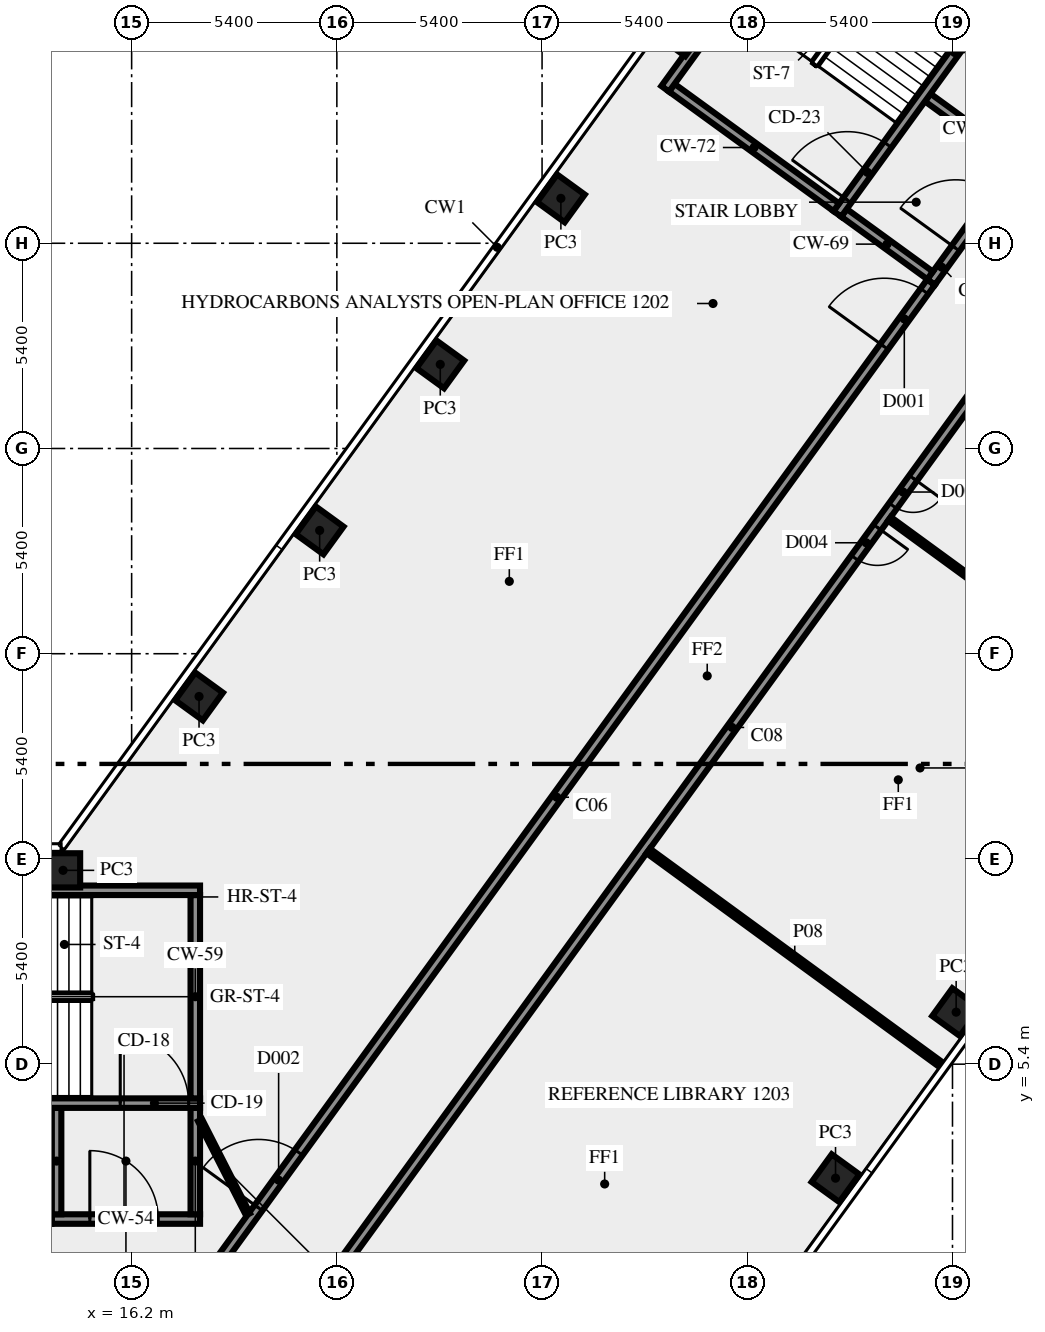
"""IFC4 building model, lengths in metres.
Left out: names, types, materials, properties, quantities, classifications, styles, units other than length and angle.
Written with IfcOpenShell. Run it as: python <this file> out.ifc"""

import sys

from ifc_helpers import new_model, si_unit, direction, frame, frame_2d, origin, origin_2d, place, context, subcontext, project, spatial, rectangle, extrude, element, fill, save


model = new_model("IFC4")
c1 = context("Model", 3, precision=1e-05, world=origin(), true_north=direction((0.0, 1.0)))
c2 = subcontext(c1, "Body", "Model", "MODEL_VIEW")
j1 = project(units=[si_unit("LENGTHUNIT", "METRE"), si_unit("PLANEANGLEUNIT", "RADIAN")], contexts=[c1])
p1 = place(None, origin())
s1 = spatial("IfcSite", under=j1, at=p1, CompositionType="ELEMENT")
p2 = place(p1, origin())
s2 = spatial("IfcBuilding", under=s1, at=p2, CompositionType="ELEMENT")
p3 = place(p2, frame((0.0, 0.0, 55.0)))
s3 = spatial("IfcBuildingStorey", under=s2, at=p3, CompositionType="ELEMENT", Elevation=55.0)
for number, where, z_axis, x_axis in (
    (1, (34.722, 2.4, 0.0), (0.0, 0.0, 1.0), (0.588, 0.809, 0.0)),
    (2, (37.896, 6.769, 0.0), (0.0, 0.0, 1.0), (0.588, 0.809, 0.0)),
    (3, (30.669, 32.55, 0.0), (0.0, 0.0, 1.0), (-0.588, -0.809, 0.0)),
    (4, (27.495, 28.181, 0.0), (0.0, 0.0, 1.0), (-0.588, -0.809, 0.0)),
    (5, (24.321, 23.812, 0.0), (0.0, 0.0, 1.0), (-0.588, -0.809, 0.0)),
    (6, (21.147, 19.444, 0.0), (0.0, 0.0, 1.0), (-0.588, -0.809, 0.0)),
    (7, (17.974, 15.075, 0.0), (0.0, 0.0, 1.0), (-0.588, -0.809, 0.0)),
    (8, (14.395, 10.5, 0.0), (0.0, 0.0, 1.0), (-1.0, 0.0, 0.0)),
):
    element("IfcColumn", number, at=place(p3, frame(where, z_axis=z_axis, x_axis=x_axis)), inside=s3, PredefinedType="COLUMN", context=c2, shape_type="SweptSolid", body=[
        extrude(rectangle(XDim=0.9, YDim=0.9, at=origin_2d()), origin(), (0.0, 0.0, 1.0), 3.65),
    ])
p4 = place(p3, frame((14.1, 1.325, 0.0), z_axis=(0.0, 0.0, 1.0), x_axis=(1.0, 0.0, 0.0)))
e9 = element("IfcWall", 9, at=p4, inside=s3, PredefinedType="SHEAR", context=c2, shape_type="SweptSolid", body=[
    extrude(rectangle(XDim=3.9, YDim=0.25, at=frame_2d((1.95, 0.0))), origin(), (0.0, 0.0, 1.0), 3.65),
])
p5 = place(p4, frame((1.0, 0.0, 0.0)))
e10 = element("IfcOpeningElement", 10, at=p5, cuts=e9, PredefinedType="OPENING", context=c2, shape_type="SweptSolid", body=[
    extrude(rectangle(XDim=1.8, YDim=2.1, at=frame_2d((0.9, 1.05))), frame((0.0, 0.135, 0.0), z_axis=(0.0, -1.0, 0.0), x_axis=(1.0, 0.0, 0.0)), (0.0, 0.0, 1.0), 0.27),
])
for number, where, z_axis, x_axis in (
    (11, (14.225, 1.45, 0.0), (0.0, 0.0, 1.0), (0.0, 1.0, 0.0)),
    (12, (17.875, 1.45, 0.0), (0.0, 0.0, 1.0), (0.0, 1.0, 0.0)),
):
    element("IfcWall", number, at=place(p3, frame(where, z_axis=z_axis, x_axis=x_axis)), inside=s3, PredefinedType="SHEAR", context=c2, shape_type="SweptSolid", body=[
        extrude(rectangle(XDim=2.8, YDim=0.25, at=frame_2d((1.4, 0.0))), origin(), (0.0, 0.0, 1.0), 3.65),
    ])
p6 = place(p3, frame((7.5, 4.375, 0.0), z_axis=(0.0, 0.0, 1.0), x_axis=(1.0, 0.0, 0.0)))
e13 = element("IfcWall", 13, at=p6, inside=s3, PredefinedType="SHEAR", context=c2, shape_type="SweptSolid", body=[
    extrude(rectangle(XDim=10.5, YDim=0.25, at=frame_2d((5.25, 0.0))), origin(), (0.0, 0.0, 1.0), 3.65),
])
p7 = place(p6, frame((8.4, 0.0, 0.0)))
e14 = element("IfcOpeningElement", 14, at=p7, cuts=e13, PredefinedType="OPENING", context=c2, shape_type="SweptSolid", body=[
    extrude(rectangle(XDim=1.8, YDim=2.1, at=frame_2d((0.9, 1.05))), frame((0.0, 0.135, 0.0), z_axis=(0.0, -1.0, 0.0), x_axis=(1.0, 0.0, 0.0)), (0.0, 0.0, 1.0), 0.27),
])
p8 = place(p3, frame((17.875, 4.5, 0.0), z_axis=(0.0, 0.0, 1.0), x_axis=(0.0, 1.0, 0.0)))
e15 = element("IfcWall", 15, at=p8, inside=s3, PredefinedType="SHEAR", context=c2, shape_type="SweptSolid", body=[
    extrude(rectangle(XDim=5.35, YDim=0.25, at=frame_2d((2.675, 0.0))), origin(), (0.0, 0.0, 1.0), 3.65),
])
p9 = place(p3, frame((7.5, 9.975, 0.0), z_axis=(0.0, 0.0, 1.0), x_axis=(1.0, 0.0, 0.0)))
e16 = element("IfcWall", 16, at=p9, inside=s3, PredefinedType="SHEAR", context=c2, shape_type="SweptSolid", body=[
    extrude(rectangle(XDim=10.5, YDim=0.25, at=frame_2d((5.25, 0.0))), origin(), (0.0, 0.0, 1.0), 3.65),
])
p10 = place(p9, frame((2.0, 0.0, 1.0)))
e17 = element("IfcOpeningElement", 17, at=p10, cuts=e16, PredefinedType="OPENING", context=c2, shape_type="SweptSolid", body=[
    extrude(rectangle(XDim=1.2, YDim=1.2, at=frame_2d((0.6, 0.6))), frame((0.0, 0.135, 0.0), z_axis=(0.0, -1.0, 0.0), x_axis=(1.0, 0.0, 0.0)), (0.0, 0.0, 1.0), 0.27),
])
p11 = place(p3, frame((37.238, 25.98, 0.0), z_axis=(0.0, 0.0, 1.0), x_axis=(0.587772420479, 0.809026317077, 0.0)))
e18 = element("IfcWall", 18, at=p11, inside=s3, PredefinedType="SHEAR", context=c2, shape_type="SweptSolid", body=[
    extrude(rectangle(XDim=4.0, YDim=0.25, at=frame_2d((2.0, 0.0))), origin(), (0.0, 0.0, 1.0), 3.65),
])
p12 = place(p11, frame((1.1, 0.0, 0.0)))
e19 = element("IfcOpeningElement", 19, at=p12, cuts=e18, PredefinedType="OPENING", context=c2, shape_type="SweptSolid", body=[
    extrude(rectangle(XDim=1.8, YDim=2.1, at=frame_2d((0.9, 1.05))), frame((0.0, 0.135, 0.0), z_axis=(0.0, -1.0, 0.0), x_axis=(1.0, 0.0, 0.0)), (0.0, 0.0, 1.0), 0.27),
])
for number, where, z_axis, x_axis in (
    (20, (37.21, 26.154, 0.0), (0.0, 0.0, 1.0), (-0.809, 0.588, 0.0)),
    (21, (39.414, 29.188, 0.0), (0.0, 0.0, 1.0), (-0.809, 0.588, 0.0)),
):
    element("IfcWall", number, at=place(p3, frame(where, z_axis=z_axis, x_axis=x_axis)), inside=s3, PredefinedType="SHEAR", context=c2, shape_type="SweptSolid", body=[
        extrude(rectangle(XDim=2.8, YDim=0.25, at=frame_2d((1.4, 0.0))), origin(), (0.0, 0.0, 1.0), 3.65),
    ])
p13 = place(p3, frame((34.77, 27.772, 0.0), z_axis=(0.0, 0.0, 1.0), x_axis=(0.587795589702, 0.809009483706, 0.0)))
e22 = element("IfcWall", 22, at=p13, inside=s3, PredefinedType="SHEAR", context=c2, shape_type="SweptSolid", body=[
    extrude(rectangle(XDim=10.5, YDim=0.25, at=frame_2d((5.25, 0.0))), origin(), (0.0, 0.0, 1.0), 3.65),
])
p14 = place(p13, frame((0.45, 0.0, 0.0)))
e23 = element("IfcOpeningElement", 23, at=p14, cuts=e22, PredefinedType="OPENING", context=c2, shape_type="SweptSolid", body=[
    extrude(rectangle(XDim=1.8, YDim=2.1, at=frame_2d((0.9, 1.05))), frame((0.0, 0.135, 0.0), z_axis=(0.0, -1.0, 0.0), x_axis=(1.0, 0.0, 0.0)), (0.0, 0.0, 1.0), 0.27),
])
p15 = place(p3, frame((34.742, 27.947, 0.0), z_axis=(0.0, 0.0, 1.0), x_axis=(-0.8089984606, 0.587810760999, 0.0)))
e24 = element("IfcWall", 24, at=p15, inside=s3, PredefinedType="SHEAR", context=c2, shape_type="SweptSolid", body=[
    extrude(rectangle(XDim=5.35, YDim=0.25, at=frame_2d((2.675, 0.0))), origin(), (0.0, 0.0, 1.0), 3.65),
])
p16 = place(p3, frame((30.24, 31.064, 0.0), z_axis=(0.0, 0.0, 1.0), x_axis=(0.587795589702, 0.809009483706, 0.0)))
e25 = element("IfcWall", 25, at=p16, inside=s3, PredefinedType="SHEAR", context=c2, shape_type="SweptSolid", body=[
    extrude(rectangle(XDim=10.5, YDim=0.25, at=frame_2d((5.25, 0.0))), origin(), (0.0, 0.0, 1.0), 3.65),
])
p17 = place(p16, frame((2.15, 0.0, 1.0)))
e26 = element("IfcOpeningElement", 26, at=p17, cuts=e25, PredefinedType="OPENING", context=c2, shape_type="SweptSolid", body=[
    extrude(rectangle(XDim=1.2, YDim=1.2, at=frame_2d((0.6, 0.6))), frame((0.0, 0.135, 0.0), z_axis=(0.0, -1.0, 0.0), x_axis=(1.0, 0.0, 0.0)), (0.0, 0.0, 1.0), 0.27),
])
p18 = place(p3, frame((17.545, -1.125, 0.0), z_axis=(0.0, 0.0, 1.0), x_axis=(0.587786323093, 0.809016216391, 0.0)))
e27 = element("IfcWall", 27, at=p18, inside=s3, PredefinedType="SOLIDWALL", context=c2, shape_type="SweptSolid", body=[
    extrude(rectangle(XDim=33.493, YDim=0.25, at=frame_2d((16.747, 0.0))), origin(), (0.0, 0.0, 1.0), 3.65),
])
p19 = place(p18, frame((31.403, 0.0, 0.0)))
e28 = element("IfcOpeningElement", 28, at=p19, cuts=e27, PredefinedType="OPENING", context=c2, shape_type="SweptSolid", body=[
    extrude(rectangle(XDim=1.8, YDim=2.1, at=frame_2d((0.9, 1.05))), frame((0.0, 0.135, 0.0), z_axis=(0.0, -1.0, 0.0), x_axis=(1.0, 0.0, 0.0)), (0.0, 0.0, 1.0), 0.27),
])
p20 = place(p18, frame((3.392, 0.0, 0.0)))
e29 = element("IfcOpeningElement", 29, at=p20, cuts=e27, PredefinedType="OPENING", context=c2, shape_type="SweptSolid", body=[
    extrude(rectangle(XDim=1.8, YDim=2.1, at=frame_2d((0.9, 1.05))), frame((0.0, 0.135, 0.0), z_axis=(0.0, -1.0, 0.0), x_axis=(1.0, 0.0, 0.0)), (0.0, 0.0, 1.0), 0.27),
])
p21 = place(p3, frame((43.467, 30.045, 0.0), z_axis=(0.0, 0.0, 1.0), x_axis=(-0.587784726077, -0.809017376692, 0.0)))
e30 = element("IfcWall", 30, at=p21, inside=s3, PredefinedType="SOLIDWALL", context=c2, shape_type="SweptSolid", body=[
    extrude(rectangle(XDim=39.02, YDim=0.25, at=frame_2d((19.51, 0.0))), origin(), (0.0, 0.0, 1.0), 3.65),
])
p22 = place(p21, frame((11.404, 0.0, 0.0)))
e31 = element("IfcOpeningElement", 31, at=p22, cuts=e30, PredefinedType="OPENING", context=c2, shape_type="SweptSolid", body=[
    extrude(rectangle(XDim=0.9, YDim=2.1, at=frame_2d((0.45, 1.05))), frame((0.0, 0.135, 0.0), z_axis=(0.0, -1.0, 0.0), x_axis=(1.0, 0.0, 0.0)), (0.0, 0.0, 1.0), 0.27),
])
p23 = place(p21, frame((13.004, 0.0, 0.0)))
e32 = element("IfcOpeningElement", 32, at=p23, cuts=e30, PredefinedType="OPENING", context=c2, shape_type="SweptSolid", body=[
    extrude(rectangle(XDim=1.0, YDim=2.1, at=frame_2d((0.5, 1.05))), frame((0.0, 0.135, 0.0), z_axis=(0.0, -1.0, 0.0), x_axis=(1.0, 0.0, 0.0)), (0.0, 0.0, 1.0), 0.27),
])
p24 = place(p21, frame((37.287, 0.0, 0.0)))
e33 = element("IfcOpeningElement", 33, at=p24, cuts=e30, PredefinedType="OPENING", context=c2, shape_type="SweptSolid", body=[
    extrude(rectangle(XDim=1.2, YDim=2.1, at=frame_2d((0.6, 1.05))), frame((0.0, 0.135, 0.0), z_axis=(0.0, -1.0, 0.0), x_axis=(1.0, 0.0, 0.0)), (0.0, 0.0, 1.0), 0.27),
])
p25 = place(p21, frame((0.224, 0.0, 0.0)))
e34 = element("IfcOpeningElement", 34, at=p25, cuts=e30, PredefinedType="OPENING", context=c2, shape_type="SweptSolid", body=[
    extrude(rectangle(XDim=0.9, YDim=2.1, at=frame_2d((0.45, 1.05))), frame((0.0, 0.135, 0.0), z_axis=(0.0, -1.0, 0.0), x_axis=(1.0, 0.0, 0.0)), (0.0, 0.0, 1.0), 0.27),
])
p26 = place(p3, frame((36.141, 19.749, 0.0), z_axis=(0.0, 0.0, 1.0), x_axis=(0.807691251741, -0.589605666408, 0.0)))
e35 = element("IfcWall", 35, at=p26, inside=s3, PredefinedType="PARTITIONING", context=c2, shape_type="SweptSolid", body=[
    extrude(rectangle(XDim=9.55, YDim=0.12, at=frame_2d((4.775, 0.0))), origin(), (0.0, 0.0, 1.0), 2.75),
])
p27 = place(p3, frame((29.793, 11.012, 0.0), z_axis=(0.0, 0.0, 1.0), x_axis=(0.807645841498, -0.589667868135, 0.0)))
e36 = element("IfcWall", 36, at=p27, inside=s3, PredefinedType="PARTITIONING", context=c2, shape_type="SweptSolid", body=[
    extrude(rectangle(XDim=9.551, YDim=0.15, at=frame_2d((4.775, 0.0))), origin(), (0.0, 0.0, 1.0), 2.75),
])
p28 = place(p3, frame((18.0, 3.925, 0.0), z_axis=(0.0, 0.0, 1.0), x_axis=(0.453950796792, -0.891026752736, 0.0)))
e37 = element("IfcWall", 37, at=p28, inside=s3, PredefinedType="PARTITIONING", context=c2, shape_type="SweptSolid", body=[
    extrude(rectangle(XDim=2.778, YDim=0.12, at=frame_2d((1.389, 0.0))), origin(), (0.0, 0.0, 1.0), 3.65),
])
p29 = place(p5, origin())
e38 = element("IfcDoor", 38, at=p29, inside=s3, OperationType="DOUBLE_DOOR_SINGLE_SWING", PredefinedType="DOOR", context=c2, shape_type="SweptSolid", body=[
    extrude(rectangle(XDim=1.8, YDim=2.1, at=frame_2d((0.9, 1.05))), frame((0.0, 0.025, 0.0), z_axis=(0.0, -1.0, 0.0), x_axis=(1.0, 0.0, 0.0)), (0.0, 0.0, 1.0), 0.05),
])
fill(e10, e38)
p30 = place(p7, origin())
e39 = element("IfcDoor", 39, at=p30, inside=s3, OperationType="DOUBLE_DOOR_SINGLE_SWING", PredefinedType="DOOR", context=c2, shape_type="SweptSolid", body=[
    extrude(rectangle(XDim=1.8, YDim=2.1, at=frame_2d((0.9, 1.05))), frame((0.0, 0.025, 0.0), z_axis=(0.0, -1.0, 0.0), x_axis=(1.0, 0.0, 0.0)), (0.0, 0.0, 1.0), 0.05),
])
fill(e14, e39)
p31 = place(p12, origin())
e40 = element("IfcDoor", 40, at=p31, inside=s3, OperationType="DOUBLE_DOOR_SINGLE_SWING", PredefinedType="DOOR", context=c2, shape_type="SweptSolid", body=[
    extrude(rectangle(XDim=1.8, YDim=2.1, at=frame_2d((0.9, 1.05))), frame((0.0, 0.025, 0.0), z_axis=(0.0, -1.0, 0.0), x_axis=(1.0, 0.0, 0.0)), (0.0, 0.0, 1.0), 0.05),
])
fill(e19, e40)
p32 = place(p14, origin())
e41 = element("IfcDoor", 41, at=p32, inside=s3, OperationType="DOUBLE_DOOR_SINGLE_SWING", PredefinedType="DOOR", context=c2, shape_type="SweptSolid", body=[
    extrude(rectangle(XDim=1.8, YDim=2.1, at=frame_2d((0.9, 1.05))), frame((0.0, 0.025, 0.0), z_axis=(0.0, -1.0, 0.0), x_axis=(1.0, 0.0, 0.0)), (0.0, 0.0, 1.0), 0.05),
])
fill(e23, e41)
p33 = place(p19, origin())
e42 = element("IfcDoor", 42, at=p33, inside=s3, OperationType="DOUBLE_DOOR_SINGLE_SWING", PredefinedType="DOOR", context=c2, shape_type="SweptSolid", body=[
    extrude(rectangle(XDim=1.8, YDim=2.1, at=frame_2d((0.9, 1.05))), frame((0.0, 0.025, 0.0), z_axis=(0.0, -1.0, 0.0), x_axis=(1.0, 0.0, 0.0)), (0.0, 0.0, 1.0), 0.05),
])
fill(e28, e42)
p34 = place(p20, origin())
e43 = element("IfcDoor", 43, at=p34, inside=s3, OperationType="DOUBLE_DOOR_SINGLE_SWING", PredefinedType="DOOR", context=c2, shape_type="SweptSolid", body=[
    extrude(rectangle(XDim=1.8, YDim=2.1, at=frame_2d((0.9, 1.05))), frame((0.0, 0.025, 0.0), z_axis=(0.0, -1.0, 0.0), x_axis=(1.0, 0.0, 0.0)), (0.0, 0.0, 1.0), 0.05),
])
fill(e29, e43)
p35 = place(p22, origin())
e44 = element("IfcDoor", 44, at=p35, inside=s3, OperationType="SINGLE_SWING_RIGHT", PredefinedType="DOOR", context=c2, shape_type="SweptSolid", body=[
    extrude(rectangle(XDim=0.9, YDim=2.1, at=frame_2d((0.45, 1.05))), frame((0.0, 0.025, 0.0), z_axis=(0.0, -1.0, 0.0), x_axis=(1.0, 0.0, 0.0)), (0.0, 0.0, 1.0), 0.05),
])
fill(e31, e44)
p36 = place(p23, origin())
e45 = element("IfcDoor", 45, at=p36, inside=s3, OperationType="SINGLE_SWING_LEFT", PredefinedType="DOOR", context=c2, shape_type="SweptSolid", body=[
    extrude(rectangle(XDim=1.0, YDim=2.1, at=frame_2d((0.5, 1.05))), frame((0.0, 0.025, 0.0), z_axis=(0.0, -1.0, 0.0), x_axis=(1.0, 0.0, 0.0)), (0.0, 0.0, 1.0), 0.05),
])
fill(e32, e45)
save(model, sys.argv[1])
